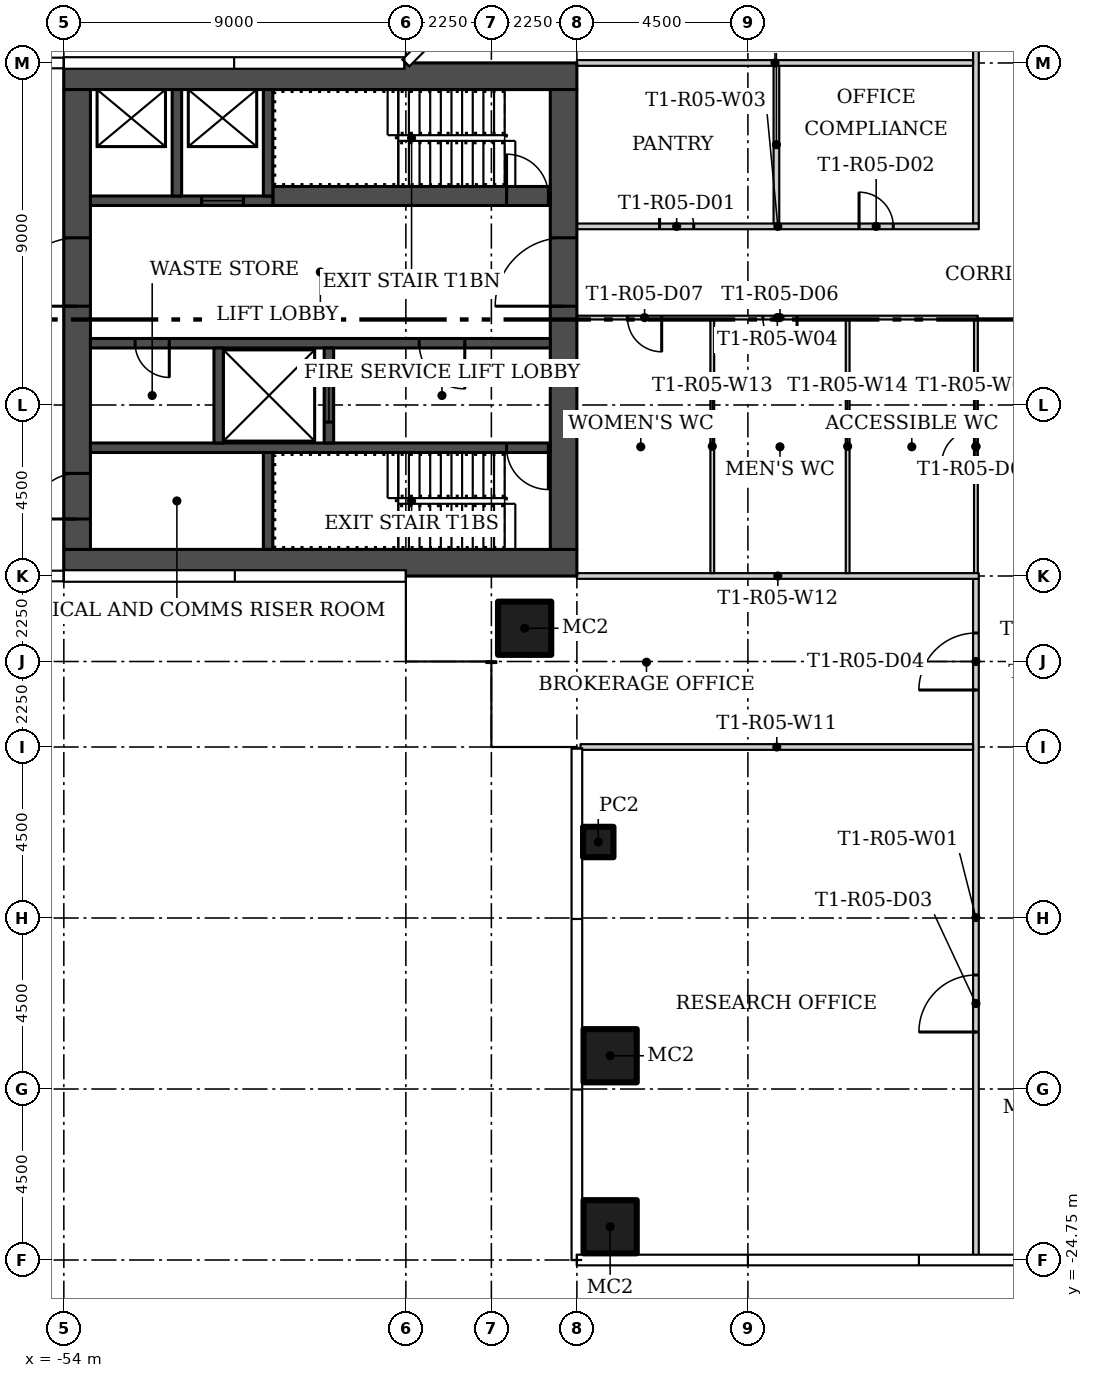
"""IFC4 building model, lengths in metres.
Left out: names, types, materials, properties, quantities, classifications, styles, units other than length and angle.
Written with IfcOpenShell. Run it as: python <this file> out.ifc"""

import sys

from ifc_helpers import new_model, si_unit, direction, frame, frame_2d, origin, origin_2d, place, context, subcontext, project, spatial, rectangle, hollow_rectangle, extrude, element, fill, save


model = new_model("IFC4")
c1 = context("Model", 3, precision=1e-05, world=origin(), true_north=direction((0.0, 1.0)))
c2 = subcontext(c1, "Body", "Model", "MODEL_VIEW")
j1 = project(units=[si_unit("LENGTHUNIT", "METRE"), si_unit("PLANEANGLEUNIT", "RADIAN")], contexts=[c1])
p1 = place(None, origin())
s1 = spatial("IfcSite", under=j1, at=p1, CompositionType="ELEMENT")
p2 = place(p1, origin())
s2 = spatial("IfcBuilding", under=s1, at=p2, CompositionType="ELEMENT")
p3 = place(p2, frame((0.0, 0.0, 57.6)))
s3 = spatial("IfcBuildingStorey", under=s2, at=p3, CompositionType="ELEMENT", Elevation=57.6)
p4 = place(p3, frame((-41.875, -8.125, 0.0)))
e1 = element("IfcColumn", 1, at=p4, inside=s3, PredefinedType="COLUMN", context=c2, shape_type="SweptSolid", body=[
    extrude(hollow_rectangle(XDim=1.4, YDim=1.4, WallThickness=0.05, at=origin_2d()), origin(), (0.0, 0.0, 1.0), 3.55),
])
p5 = place(p3, frame((-39.938, -13.75, 0.0)))
e2 = element("IfcColumn", 2, at=p5, inside=s3, PredefinedType="COLUMN", context=c2, shape_type="SweptSolid", body=[
    extrude(hollow_rectangle(XDim=0.8, YDim=0.8, WallThickness=0.025, at=origin_2d()), origin(), (0.0, 0.0, 1.0), 3.55),
])
for number, where in (
    (3, (-39.625, -19.375, 0.0)),
    (4, (-39.625, -23.875, 0.0)),
):
    element("IfcColumn", number, at=place(p3, frame(where)), inside=s3, PredefinedType="COLUMN", context=c2, shape_type="SweptSolid", body=[
        extrude(hollow_rectangle(XDim=1.4, YDim=1.4, WallThickness=0.05, at=origin_2d()), origin(), (0.0, 0.0, 1.0), 3.55),
    ])
p6 = place(p3, frame((-30.0, -24.655, 0.0), z_axis=(0.0, 0.0, 1.0), x_axis=(0.0, 1.0, 0.0)))
e5 = element("IfcWall", 5, at=p6, inside=s3, PredefinedType="PARTITIONING", context=c2, shape_type="SweptSolid", body=[
    extrude(rectangle(XDim=17.83, YDim=0.15, at=frame_2d((8.915, 0.0))), origin(), (0.0, 0.0, 1.0), 3.55),
])
p7 = place(p6, frame((5.905, 0.0, 0.0)))
e6 = element("IfcOpeningElement", 6, at=p7, cuts=e5, PredefinedType="OPENING", context=c2, shape_type="SweptSolid", body=[
    extrude(rectangle(XDim=1.5, YDim=2.1, at=frame_2d((0.75, 1.05))), frame((0.0, 0.085, 0.0), z_axis=(0.0, -1.0, 0.0), x_axis=(1.0, 0.0, 0.0)), (0.0, 0.0, 1.0), 0.17),
])
p8 = place(p6, frame((14.905, 0.0, 0.0)))
e7 = element("IfcOpeningElement", 7, at=p8, cuts=e5, PredefinedType="OPENING", context=c2, shape_type="SweptSolid", body=[
    extrude(rectangle(XDim=1.5, YDim=2.1, at=frame_2d((0.75, 1.05))), frame((0.0, 0.085, 0.0), z_axis=(0.0, -1.0, 0.0), x_axis=(1.0, 0.0, 0.0)), (0.0, 0.0, 1.0), 0.17),
])
p9 = place(p3, frame((-30.0, 2.525, 0.0), z_axis=(0.0, 0.0, 1.0), x_axis=(0.0, 1.0, 0.0)))
e8 = element("IfcWall", 8, at=p9, inside=s3, PredefinedType="PARTITIONING", context=c2, shape_type="SweptSolid", body=[
    extrude(rectangle(XDim=22.13, YDim=0.15, at=frame_2d((11.065, 0.0))), origin(), (0.0, 0.0, 1.0), 3.55),
])
p10 = place(p9, frame((5.725, 0.0, 0.0)))
e9 = element("IfcOpeningElement", 9, at=p10, cuts=e8, PredefinedType="OPENING", context=c2, shape_type="SweptSolid", body=[
    extrude(rectangle(XDim=1.5, YDim=2.1, at=frame_2d((0.75, 1.05))), frame((0.0, 0.085, 0.0), z_axis=(0.0, -1.0, 0.0), x_axis=(1.0, 0.0, 0.0)), (0.0, 0.0, 1.0), 0.17),
])
p11 = place(p9, frame((14.725, 0.0, 0.0)))
e10 = element("IfcOpeningElement", 10, at=p11, cuts=e8, PredefinedType="OPENING", context=c2, shape_type="SweptSolid", body=[
    extrude(rectangle(XDim=1.5, YDim=2.1, at=frame_2d((0.75, 1.05))), frame((0.0, 0.085, 0.0), z_axis=(0.0, -1.0, 0.0), x_axis=(1.0, 0.0, 0.0)), (0.0, 0.0, 1.0), 0.17),
])
p12 = place(p3, frame((-40.5, 2.45, 0.0)))
e11 = element("IfcWall", 11, at=p12, inside=s3, PredefinedType="PARTITIONING", context=c2, shape_type="SweptSolid", body=[
    extrude(rectangle(XDim=10.575, YDim=0.15, at=frame_2d((5.288, 0.0))), origin(), (0.0, 0.0, 1.0), 3.55),
])
p13 = place(p12, frame((2.175, 0.0, 0.0)))
e12 = element("IfcOpeningElement", 12, at=p13, cuts=e11, PredefinedType="OPENING", context=c2, shape_type="SweptSolid", body=[
    extrude(rectangle(XDim=0.9, YDim=2.1, at=frame_2d((0.45, 1.05))), frame((0.0, 0.085, 0.0), z_axis=(0.0, -1.0, 0.0), x_axis=(1.0, 0.0, 0.0)), (0.0, 0.0, 1.0), 0.17),
])
p14 = place(p12, frame((7.425, 0.0, 0.0)))
e13 = element("IfcOpeningElement", 13, at=p14, cuts=e11, PredefinedType="OPENING", context=c2, shape_type="SweptSolid", body=[
    extrude(rectangle(XDim=0.9, YDim=2.1, at=frame_2d((0.45, 1.05))), frame((0.0, 0.085, 0.0), z_axis=(0.0, -1.0, 0.0), x_axis=(1.0, 0.0, 0.0)), (0.0, 0.0, 1.0), 0.17),
])
p15 = place(p3, frame((-29.95, 0.05, 0.0), z_axis=(0.0, 0.0, 1.0), x_axis=(-1.0, 0.0, 0.0)))
e14 = element("IfcWall", 14, at=p15, inside=s3, PredefinedType="PARTITIONING", context=c2, shape_type="SweptSolid", body=[
    extrude(rectangle(XDim=10.55, YDim=0.1, at=frame_2d((5.275, 0.0))), origin(), (0.0, 0.0, 1.0), 3.55),
])
p16 = place(p15, frame((4.756, 0.0, 0.0)))
e15 = element("IfcOpeningElement", 15, at=p16, cuts=e14, PredefinedType="OPENING", context=c2, shape_type="SweptSolid", body=[
    extrude(rectangle(XDim=0.9, YDim=2.1, at=frame_2d((0.45, 1.05))), frame((0.0, 0.06, 0.0), z_axis=(0.0, -1.0, 0.0), x_axis=(1.0, 0.0, 0.0)), (0.0, 0.0, 1.0), 0.12),
])
p17 = place(p15, frame((8.319, 0.0, 0.0)))
e16 = element("IfcOpeningElement", 16, at=p17, cuts=e14, PredefinedType="OPENING", context=c2, shape_type="SweptSolid", body=[
    extrude(rectangle(XDim=0.9, YDim=2.1, at=frame_2d((0.45, 1.05))), frame((0.0, 0.06, 0.0), z_axis=(0.0, -1.0, 0.0), x_axis=(1.0, 0.0, 0.0)), (0.0, 0.0, 1.0), 0.12),
])
p18 = place(p3, frame((-30.0, -6.675, 0.0), z_axis=(0.0, 0.0, 1.0), x_axis=(0.0, 1.0, 0.0)))
e17 = element("IfcWall", 17, at=p18, inside=s3, PredefinedType="PARTITIONING", context=c2, shape_type="SweptSolid", body=[
    extrude(rectangle(XDim=6.675, YDim=0.1, at=frame_2d((3.337, 0.0))), origin(), (0.0, 0.0, 1.0), 3.55),
])
p19 = place(p18, frame((2.875, 0.0, 0.0)))
e18 = element("IfcOpeningElement", 18, at=p19, cuts=e17, PredefinedType="OPENING", context=c2, shape_type="SweptSolid", body=[
    extrude(rectangle(XDim=0.9, YDim=2.1, at=frame_2d((0.45, 1.05))), frame((0.0, 0.06, 0.0), z_axis=(0.0, -1.0, 0.0), x_axis=(1.0, 0.0, 0.0)), (0.0, 0.0, 1.0), 0.12),
])
p20 = place(p3, frame((-40.5, 6.75, 0.0)))
e19 = element("IfcWall", 19, at=p20, inside=s3, PredefinedType="PARTITIONING", context=c2, shape_type="SweptSolid", body=[
    extrude(rectangle(XDim=10.425, YDim=0.15, at=frame_2d((5.212, 0.0))), origin(), (0.0, 0.0, 1.0), 3.55),
])
p21 = place(p3, frame((-35.25, 2.525, 0.0), z_axis=(0.0, 0.0, 1.0), x_axis=(0.0, 1.0, 0.0)))
e20 = element("IfcWall", 20, at=p21, inside=s3, PredefinedType="PARTITIONING", context=c2, shape_type="SweptSolid", body=[
    extrude(rectangle(XDim=4.15, YDim=0.15, at=frame_2d((2.075, 0.0))), origin(), (0.0, 0.0, 1.0), 3.55),
])
p22 = place(p3, frame((-40.405, -11.25, 0.0)))
e21 = element("IfcWall", 21, at=p22, inside=s3, PredefinedType="PARTITIONING", context=c2, shape_type="SweptSolid", body=[
    extrude(rectangle(XDim=10.33, YDim=0.15, at=frame_2d((5.165, 0.0))), origin(), (0.0, 0.0, 1.0), 3.55),
])
p23 = place(p3, frame((-29.925, -6.75, 0.0), z_axis=(0.0, 0.0, 1.0), x_axis=(-1.0, 0.0, 0.0)))
e22 = element("IfcWall", 22, at=p23, inside=s3, PredefinedType="PARTITIONING", context=c2, shape_type="SweptSolid", body=[
    extrude(rectangle(XDim=10.575, YDim=0.15, at=frame_2d((5.288, 0.0))), origin(), (0.0, 0.0, 1.0), 3.55),
])
for number, where, z_axis, x_axis in (
    (23, (-36.938, -6.675, 0.0), (0.0, 0.0, 1.0), (0.0, 1.0, 0.0)),
    (24, (-33.375, -6.675, 0.0), (0.0, 0.0, 1.0), (0.0, 1.0, 0.0)),
):
    element("IfcWall", number, at=place(p3, frame(where, z_axis=z_axis, x_axis=x_axis)), inside=s3, PredefinedType="PARTITIONING", context=c2, shape_type="SweptSolid", body=[
        extrude(rectangle(XDim=6.675, YDim=0.1, at=frame_2d((3.337, 0.0))), origin(), (0.0, 0.0, 1.0), 3.55),
    ])
for number, where, z_axis, x_axis in (
    (25, (-40.5, -6.4, 0.0), (0.0, 0.0, 1.0), (-1.0, 0.0, 0.0)),
    (26, (-40.5, 6.4, 0.0), (0.0, 0.0, 1.0), (-1.0, 0.0, 0.0)),
):
    element("IfcWall", number, at=place(p3, frame(where, z_axis=z_axis, x_axis=x_axis)), inside=s3, PredefinedType="SHEAR", context=c2, shape_type="SweptSolid", body=[
        extrude(rectangle(XDim=13.5, YDim=0.7, at=frame_2d((6.75, 0.0))), origin(), (0.0, 0.0, 1.0), 3.55),
    ])
p24 = place(p3, frame((-40.85, -6.05, 0.0), z_axis=(0.0, 0.0, 1.0), x_axis=(0.0, 1.0, 0.0)))
e27 = element("IfcWall", 27, at=p24, inside=s3, PredefinedType="SHEAR", context=c2, shape_type="SweptSolid", body=[
    extrude(rectangle(XDim=12.1, YDim=0.7, at=frame_2d((6.05, 0.0))), origin(), (0.0, 0.0, 1.0), 3.55),
])
p25 = place(p24, frame((6.4, 0.0, 0.0)))
e28 = element("IfcOpeningElement", 28, at=p25, cuts=e27, PredefinedType="OPENING", context=c2, shape_type="SweptSolid", body=[
    extrude(rectangle(XDim=1.8, YDim=2.4, at=frame_2d((0.9, 1.2))), frame((0.0, 0.36, 0.0), z_axis=(0.0, -1.0, 0.0), x_axis=(1.0, 0.0, 0.0)), (0.0, 0.0, 1.0), 0.72),
])
p26 = place(p3, frame((-53.65, -6.05, 0.0), z_axis=(0.0, 0.0, 1.0), x_axis=(0.0, 1.0, 0.0)))
e29 = element("IfcWall", 29, at=p26, inside=s3, PredefinedType="SHEAR", context=c2, shape_type="SweptSolid", body=[
    extrude(rectangle(XDim=12.1, YDim=0.7, at=frame_2d((6.05, 0.0))), origin(), (0.0, 0.0, 1.0), 3.55),
])
p27 = place(p26, frame((0.8, 0.0, 0.0)))
e30 = element("IfcOpeningElement", 30, at=p27, cuts=e29, PredefinedType="OPENING", context=c2, shape_type="SweptSolid", body=[
    extrude(rectangle(XDim=1.2, YDim=2.1, at=frame_2d((0.6, 1.05))), frame((0.0, 0.36, 0.0), z_axis=(0.0, -1.0, 0.0), x_axis=(1.0, 0.0, 0.0)), (0.0, 0.0, 1.0), 0.72),
])
p28 = place(p26, frame((6.4, 0.0, 0.0)))
e31 = element("IfcOpeningElement", 31, at=p28, cuts=e29, PredefinedType="OPENING", context=c2, shape_type="SweptSolid", body=[
    extrude(rectangle(XDim=1.8, YDim=2.4, at=frame_2d((0.9, 1.2))), frame((0.0, 0.36, 0.0), z_axis=(0.0, -1.0, 0.0), x_axis=(1.0, 0.0, 0.0)), (0.0, 0.0, 1.0), 0.72),
])
p29 = place(p3, frame((-41.2, -3.375, 0.0), z_axis=(0.0, 0.0, 1.0), x_axis=(-1.0, 0.0, 0.0)))
e32 = element("IfcWall", 32, at=p29, inside=s3, PredefinedType="SHEAR", context=c2, shape_type="SweptSolid", body=[
    extrude(rectangle(XDim=12.1, YDim=0.25, at=frame_2d((6.05, 0.0))), origin(), (0.0, 0.0, 1.0), 3.55),
])
p30 = place(p29, frame((0.05, 0.0, 0.0)))
e33 = element("IfcOpeningElement", 33, at=p30, cuts=e32, PredefinedType="OPENING", context=c2, shape_type="SweptSolid", body=[
    extrude(rectangle(XDim=1.1, YDim=2.1, at=frame_2d((0.55, 1.05))), frame((0.0, 0.135, 0.0), z_axis=(0.0, -1.0, 0.0), x_axis=(1.0, 0.0, 0.0)), (0.0, 0.0, 1.0), 0.27),
])
p31 = place(p3, frame((-48.625, -6.05, 0.0), z_axis=(0.0, 0.0, 1.0), x_axis=(0.0, 1.0, 0.0)))
e34 = element("IfcWall", 34, at=p31, inside=s3, PredefinedType="SHEAR", context=c2, shape_type="SweptSolid", body=[
    extrude(rectangle(XDim=2.55, YDim=0.25, at=frame_2d((1.275, 0.0))), origin(), (0.0, 0.0, 1.0), 3.55),
])
p32 = place(p3, frame((-41.2, -0.625, 0.0), z_axis=(0.0, 0.0, 1.0), x_axis=(-1.0, 0.0, 0.0)))
e35 = element("IfcWall", 35, at=p32, inside=s3, PredefinedType="SHEAR", context=c2, shape_type="SweptSolid", body=[
    extrude(rectangle(XDim=12.1, YDim=0.25, at=frame_2d((6.05, 0.0))), origin(), (0.0, 0.0, 1.0), 3.55),
])
p33 = place(p32, frame((2.25, 0.0, 0.0)))
e36 = element("IfcOpeningElement", 36, at=p33, cuts=e35, PredefinedType="OPENING", context=c2, shape_type="SweptSolid", body=[
    extrude(rectangle(XDim=1.2, YDim=2.1, at=frame_2d((0.6, 1.05))), frame((0.0, 0.135, 0.0), z_axis=(0.0, -1.0, 0.0), x_axis=(1.0, 0.0, 0.0)), (0.0, 0.0, 1.0), 0.27),
])
p34 = place(p32, frame((10.025, 0.0, 0.0)))
e37 = element("IfcOpeningElement", 37, at=p34, cuts=e35, PredefinedType="OPENING", context=c2, shape_type="SweptSolid", body=[
    extrude(rectangle(XDim=0.9, YDim=2.1, at=frame_2d((0.45, 1.05))), frame((0.0, 0.135, 0.0), z_axis=(0.0, -1.0, 0.0), x_axis=(1.0, 0.0, 0.0)), (0.0, 0.0, 1.0), 0.27),
])
p35 = place(p3, frame((-47.025, -3.25, 0.0), z_axis=(0.0, 0.0, 1.0), x_axis=(0.0, 1.0, 0.0)))
e38 = element("IfcWall", 38, at=p35, inside=s3, PredefinedType="SHEAR", context=c2, shape_type="SweptSolid", body=[
    extrude(rectangle(XDim=2.5, YDim=0.25, at=frame_2d((1.25, 0.0))), origin(), (0.0, 0.0, 1.0), 3.55),
])
p36 = place(p35, frame((0.55, 0.0, 0.0)))
e39 = element("IfcOpeningElement", 39, at=p36, cuts=e38, PredefinedType="OPENING", context=c2, shape_type="SweptSolid", body=[
    extrude(rectangle(XDim=1.4, YDim=2.4, at=frame_2d((0.7, 1.2))), frame((0.0, 0.135, 0.0), z_axis=(0.0, -1.0, 0.0), x_axis=(1.0, 0.0, 0.0)), (0.0, 0.0, 1.0), 0.27),
])
p37 = place(p3, frame((-49.925, -3.25, 0.0), z_axis=(0.0, 0.0, 1.0), x_axis=(0.0, 1.0, 0.0)))
e40 = element("IfcWall", 40, at=p37, inside=s3, PredefinedType="SHEAR", context=c2, shape_type="SweptSolid", body=[
    extrude(rectangle(XDim=2.5, YDim=0.25, at=frame_2d((1.25, 0.0))), origin(), (0.0, 0.0, 1.0), 3.55),
])
p38 = place(p3, frame((-48.5, 3.25, 0.0)))
e41 = element("IfcWall", 41, at=p38, inside=s3, PredefinedType="SHEAR", context=c2, shape_type="SweptSolid", body=[
    extrude(rectangle(XDim=7.3, YDim=0.5, at=frame_2d((3.65, 0.0))), origin(), (0.0, 0.0, 1.0), 3.55),
])
p39 = place(p38, frame((6.15, 0.0, 0.0)))
e42 = element("IfcOpeningElement", 42, at=p39, cuts=e41, PredefinedType="OPENING", context=c2, shape_type="SweptSolid", body=[
    extrude(rectangle(XDim=1.1, YDim=2.1, at=frame_2d((0.55, 1.05))), frame((0.0, 0.26, 0.0), z_axis=(0.0, -1.0, 0.0), x_axis=(1.0, 0.0, 0.0)), (0.0, 0.0, 1.0), 0.52),
])
p40 = place(p3, frame((-48.5, 3.125, 0.0), z_axis=(0.0, 0.0, 1.0), x_axis=(-1.0, 0.0, 0.0)))
e43 = element("IfcWall", 43, at=p40, inside=s3, PredefinedType="SHEAR", context=c2, shape_type="SweptSolid", body=[
    extrude(rectangle(XDim=4.8, YDim=0.25, at=frame_2d((2.4, 0.0))), origin(), (0.0, 0.0, 1.0), 3.55),
])
p41 = place(p40, frame((0.775, 0.0, 0.0)))
e44 = element("IfcOpeningElement", 44, at=p41, cuts=e43, PredefinedType="OPENING", context=c2, shape_type="SweptSolid", body=[
    extrude(rectangle(XDim=1.1, YDim=2.1, at=frame_2d((0.55, 1.05))), frame((0.0, 0.135, 0.0), z_axis=(0.0, -1.0, 0.0), x_axis=(1.0, 0.0, 0.0)), (0.0, 0.0, 1.0), 0.27),
])
for number, where, z_axis, x_axis in (
    (45, (-48.625, 3.25, 0.0), (0.0, 0.0, 1.0), (0.0, 1.0, 0.0)),
    (46, (-51.025, 3.25, 0.0), (0.0, 0.0, 1.0), (0.0, 1.0, 0.0)),
):
    element("IfcWall", number, at=place(p3, frame(where, z_axis=z_axis, x_axis=x_axis)), inside=s3, PredefinedType="SHEAR", context=c2, shape_type="SweptSolid", body=[
        extrude(rectangle(XDim=2.8, YDim=0.25, at=frame_2d((1.4, 0.0))), origin(), (0.0, 0.0, 1.0), 3.55),
    ])
p42 = place(p13, origin())
e47 = element("IfcDoor", 47, at=p42, inside=s3, OperationType="SINGLE_SWING_LEFT", PredefinedType="DOOR", context=c2, shape_type="SweptSolid", body=[
    extrude(rectangle(XDim=0.9, YDim=2.1, at=frame_2d((0.45, 1.05))), frame((0.0, 0.025, 0.0), z_axis=(0.0, -1.0, 0.0), x_axis=(1.0, 0.0, 0.0)), (0.0, 0.0, 1.0), 0.05),
])
fill(e12, e47)
p43 = place(p14, origin())
e48 = element("IfcDoor", 48, at=p43, inside=s3, OperationType="SINGLE_SWING_RIGHT", PredefinedType="DOOR", context=c2, shape_type="SweptSolid", body=[
    extrude(rectangle(XDim=0.9, YDim=2.1, at=frame_2d((0.45, 1.05))), frame((0.0, 0.025, 0.0), z_axis=(0.0, -1.0, 0.0), x_axis=(1.0, 0.0, 0.0)), (0.0, 0.0, 1.0), 0.05),
])
fill(e13, e48)
p44 = place(p7, origin())
e49 = element("IfcDoor", 49, at=p44, inside=s3, OperationType="DOUBLE_DOOR_SINGLE_SWING", PredefinedType="DOOR", context=c2, shape_type="SweptSolid", body=[
    extrude(rectangle(XDim=1.5, YDim=2.1, at=frame_2d((0.75, 1.05))), frame((0.0, 0.025, 0.0), z_axis=(0.0, -1.0, 0.0), x_axis=(1.0, 0.0, 0.0)), (0.0, 0.0, 1.0), 0.05),
])
fill(e6, e49)
p45 = place(p8, origin())
e50 = element("IfcDoor", 50, at=p45, inside=s3, OperationType="DOUBLE_DOOR_SINGLE_SWING", PredefinedType="DOOR", context=c2, shape_type="SweptSolid", body=[
    extrude(rectangle(XDim=1.5, YDim=2.1, at=frame_2d((0.75, 1.05))), frame((0.0, 0.025, 0.0), z_axis=(0.0, -1.0, 0.0), x_axis=(1.0, 0.0, 0.0)), (0.0, 0.0, 1.0), 0.05),
])
fill(e7, e50)
p46 = place(p19, origin())
e51 = element("IfcDoor", 51, at=p46, inside=s3, OperationType="SINGLE_SWING_RIGHT", PredefinedType="DOOR", context=c2, shape_type="SweptSolid", body=[
    extrude(rectangle(XDim=0.9, YDim=2.1, at=frame_2d((0.45, 1.05))), frame((0.0, 0.025, 0.0), z_axis=(0.0, -1.0, 0.0), x_axis=(1.0, 0.0, 0.0)), (0.0, 0.0, 1.0), 0.05),
])
fill(e18, e51)
p47 = place(p16, origin())
e52 = element("IfcDoor", 52, at=p47, inside=s3, OperationType="SINGLE_SWING_LEFT", PredefinedType="DOOR", context=c2, shape_type="SweptSolid", body=[
    extrude(rectangle(XDim=0.9, YDim=2.1, at=frame_2d((0.45, 1.05))), frame((0.0, 0.025, 0.0), z_axis=(0.0, -1.0, 0.0), x_axis=(1.0, 0.0, 0.0)), (0.0, 0.0, 1.0), 0.05),
])
fill(e15, e52)
p48 = place(p17, origin())
e53 = element("IfcDoor", 53, at=p48, inside=s3, OperationType="SINGLE_SWING_RIGHT", PredefinedType="DOOR", context=c2, shape_type="SweptSolid", body=[
    extrude(rectangle(XDim=0.9, YDim=2.1, at=frame_2d((0.45, 1.05))), frame((0.0, 0.025, 0.0), z_axis=(0.0, -1.0, 0.0), x_axis=(1.0, 0.0, 0.0)), (0.0, 0.0, 1.0), 0.05),
])
fill(e16, e53)
p49 = place(p25, origin())
e54 = element("IfcDoor", 54, at=p49, inside=s3, OperationType="DOUBLE_DOOR_SINGLE_SWING", PredefinedType="DOOR", context=c2, shape_type="SweptSolid", body=[
    extrude(rectangle(XDim=1.8, YDim=2.4, at=frame_2d((0.9, 1.2))), frame((0.0, 0.025, 0.0), z_axis=(0.0, -1.0, 0.0), x_axis=(1.0, 0.0, 0.0)), (0.0, 0.0, 1.0), 0.05),
])
fill(e28, e54)
p50 = place(p27, origin())
e55 = element("IfcDoor", 55, at=p50, inside=s3, OperationType="SINGLE_SWING_LEFT", PredefinedType="DOOR", context=c2, shape_type="SweptSolid", body=[
    extrude(rectangle(XDim=1.2, YDim=2.1, at=frame_2d((0.6, 1.05))), frame((0.0, 0.025, 0.0), z_axis=(0.0, -1.0, 0.0), x_axis=(1.0, 0.0, 0.0)), (0.0, 0.0, 1.0), 0.05),
])
fill(e30, e55)
p51 = place(p28, origin())
e56 = element("IfcDoor", 56, at=p51, inside=s3, OperationType="DOUBLE_DOOR_SINGLE_SWING", PredefinedType="DOOR", context=c2, shape_type="SweptSolid", body=[
    extrude(rectangle(XDim=1.8, YDim=2.4, at=frame_2d((0.9, 1.2))), frame((0.0, 0.025, 0.0), z_axis=(0.0, -1.0, 0.0), x_axis=(1.0, 0.0, 0.0)), (0.0, 0.0, 1.0), 0.05),
])
fill(e31, e56)
p52 = place(p30, origin())
e57 = element("IfcDoor", 57, at=p52, inside=s3, OperationType="SINGLE_SWING_LEFT", PredefinedType="DOOR", context=c2, shape_type="SweptSolid", body=[
    extrude(rectangle(XDim=1.1, YDim=2.1, at=frame_2d((0.55, 1.05))), frame((0.0, 0.025, 0.0), z_axis=(0.0, -1.0, 0.0), x_axis=(1.0, 0.0, 0.0)), (0.0, 0.0, 1.0), 0.05),
])
fill(e33, e57)
p53 = place(p33, origin())
e58 = element("IfcDoor", 58, at=p53, inside=s3, OperationType="SINGLE_SWING_LEFT", PredefinedType="DOOR", context=c2, shape_type="SweptSolid", body=[
    extrude(rectangle(XDim=1.2, YDim=2.1, at=frame_2d((0.6, 1.05))), frame((0.0, 0.025, 0.0), z_axis=(0.0, -1.0, 0.0), x_axis=(1.0, 0.0, 0.0)), (0.0, 0.0, 1.0), 0.05),
])
fill(e36, e58)
p54 = place(p34, origin())
e59 = element("IfcDoor", 59, at=p54, inside=s3, OperationType="SINGLE_SWING_RIGHT", PredefinedType="DOOR", context=c2, shape_type="SweptSolid", body=[
    extrude(rectangle(XDim=0.9, YDim=2.1, at=frame_2d((0.45, 1.05))), frame((0.0, 0.025, 0.0), z_axis=(0.0, -1.0, 0.0), x_axis=(1.0, 0.0, 0.0)), (0.0, 0.0, 1.0), 0.05),
])
fill(e37, e59)
p55 = place(p36, origin())
e60 = element("IfcDoor", 60, at=p55, inside=s3, OperationType="SLIDING_TO_LEFT", PredefinedType="DOOR", context=c2, shape_type="SweptSolid", body=[
    extrude(rectangle(XDim=1.4, YDim=2.4, at=frame_2d((0.7, 1.2))), frame((0.0, 0.025, 0.0), z_axis=(0.0, -1.0, 0.0), x_axis=(1.0, 0.0, 0.0)), (0.0, 0.0, 1.0), 0.05),
])
fill(e39, e60)
p56 = place(p39, origin())
e61 = element("IfcDoor", 61, at=p56, inside=s3, OperationType="SINGLE_SWING_RIGHT", PredefinedType="DOOR", context=c2, shape_type="SweptSolid", body=[
    extrude(rectangle(XDim=1.1, YDim=2.1, at=frame_2d((0.55, 1.05))), frame((0.0, 0.025, 0.0), z_axis=(0.0, -1.0, 0.0), x_axis=(1.0, 0.0, 0.0)), (0.0, 0.0, 1.0), 0.05),
])
fill(e42, e61)
p57 = place(p41, origin())
e62 = element("IfcDoor", 62, at=p57, inside=s3, OperationType="SLIDING_TO_LEFT", PredefinedType="DOOR", context=c2, shape_type="SweptSolid", body=[
    extrude(rectangle(XDim=1.1, YDim=2.1, at=frame_2d((0.55, 1.05))), frame((0.0, 0.025, 0.0), z_axis=(0.0, -1.0, 0.0), x_axis=(1.0, 0.0, 0.0)), (0.0, 0.0, 1.0), 0.05),
])
fill(e44, e62)
save(model, sys.argv[1])
